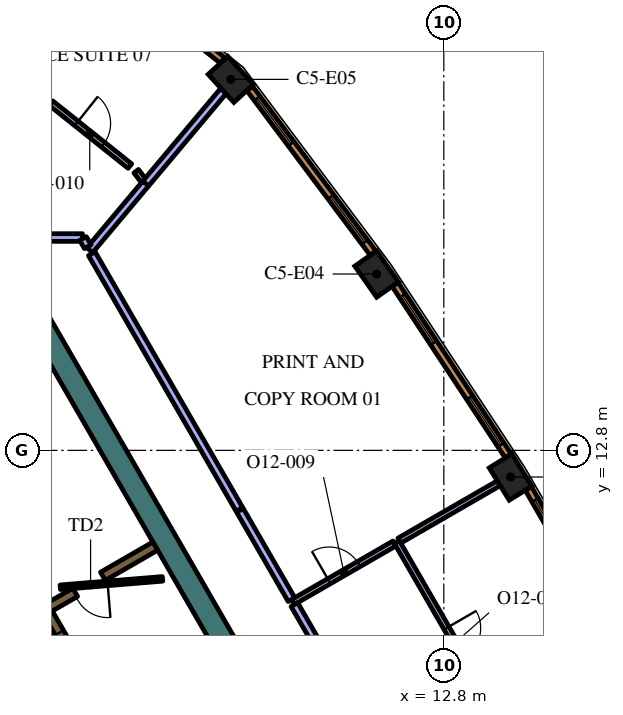
"""IFC4 building model, lengths in metres.
Left out: names, types, materials, properties, quantities, classifications, styles, units other than length and angle.
Written with IfcOpenShell. Run it as: python <this file> out.ifc"""

import sys

from ifc_helpers import new_model, si_unit, direction, frame, frame_2d, origin, origin_2d, place, context, subcontext, project, spatial, rectangle, extrude, element, fill, save


model = new_model("IFC4")
c1 = context("Model", 3, precision=1e-05, world=origin(), true_north=direction((0.0, 1.0)))
c2 = subcontext(c1, "Body", "Model", "MODEL_VIEW")
j1 = project(units=[si_unit("LENGTHUNIT", "METRE"), si_unit("PLANEANGLEUNIT", "RADIAN")], contexts=[c1])
p1 = place(None, origin())
s1 = spatial("IfcSite", under=j1, at=p1, CompositionType="ELEMENT")
p2 = place(p1, origin())
s2 = spatial("IfcBuilding", under=s1, at=p2, CompositionType="ELEMENT")
p3 = place(p2, frame((0.0, 0.0, 283.8)))
s3 = spatial("IfcBuildingStorey", under=s2, at=p3, CompositionType="ELEMENT", Elevation=283.8)
for number, where, z_axis, x_axis in (
    (1, (14.556, 12.098, 0.0), (0.0, 0.0, 1.0), (-0.526, 0.851, 0.0)),
    (2, (11.032, 17.44, 0.0), (0.0, 0.0, 1.0), (-0.575, 0.818, 0.0)),
    (3, (7.195, 22.561, 0.0), (0.0, 0.0, 1.0), (-0.676, 0.737, 0.0)),
):
    element("IfcColumn", number, at=place(p3, frame(where, z_axis=z_axis, x_axis=x_axis)), inside=s3, PredefinedType="COLUMN", context=c2, shape_type="SweptSolid", body=[
        extrude(rectangle(XDim=1.0, YDim=0.7, at=origin_2d()), origin(), (0.0, 0.0, 1.0), 4.2),
    ])
p4 = place(p3, frame((1.989, 16.456, 0.0), z_axis=(0.0, 0.0, 1.0), x_axis=(0.49999102663, -0.8660305845, 0.0)))
e4 = element("IfcWall", 4, at=p4, inside=s3, PredefinedType="SOLIDWALL", context=c2, shape_type="SweptSolid", body=[
    extrude(rectangle(XDim=12.406, YDim=0.6, at=frame_2d((6.203, 0.0))), origin(), (0.0, 0.0, 1.0), 4.2),
])
p5 = place(p3, frame((3.1, 9.064, 0.0), z_axis=(0.0, 0.0, 1.0), x_axis=(-0.866030133475, -0.499991807846, 0.0)))
e5 = element("IfcWall", 5, at=p5, inside=s3, PredefinedType="SOLIDWALL", context=c2, shape_type="SweptSolid", body=[
    extrude(rectangle(XDim=3.217, YDim=0.25, at=frame_2d((1.608, 0.0))), origin(), (0.0, 0.0, 1.0), 4.2),
])
p6 = place(p3, frame((3.83, 9.486, 0.0), z_axis=(0.0, 0.0, 1.0), x_axis=(0.865986202621, 0.500067892261, 0.0)))
e6 = element("IfcWall", 6, at=p6, inside=s3, PredefinedType="SOLIDWALL", context=c2, shape_type="SweptSolid", body=[
    extrude(rectangle(XDim=1.591, YDim=0.25, at=frame_2d((0.795, 0.0))), origin(), (0.0, 0.0, 1.0), 4.2),
])
p7 = place(p3, frame((8.565, -2.185, 0.0), z_axis=(0.0, 0.0, 1.0), x_axis=(-0.499997954832, 0.866026584559, 0.0)))
e7 = element("IfcWall", 7, at=p7, inside=s3, PredefinedType="SOLIDWALL", context=c2, shape_type="SweptSolid", body=[
    extrude(rectangle(XDim=12.35, YDim=0.25, at=frame_2d((6.175, 0.0))), origin(), (0.0, 0.0, 1.0), 4.2),
])
p8 = place(p7, frame((0.685, 0.0, 0.0)))
e8 = element("IfcOpeningElement", 8, at=p8, cuts=e7, PredefinedType="OPENING", context=c2, shape_type="SweptSolid", body=[
    extrude(rectangle(XDim=0.9, YDim=2.1, at=frame_2d((0.45, 1.05))), frame((0.0, 0.135, 0.0), z_axis=(0.0, -1.0, 0.0), x_axis=(1.0, 0.0, 0.0)), (0.0, 0.0, 1.0), 0.27),
])
p9 = place(p7, frame((3.105, 0.0, 0.0)))
e9 = element("IfcOpeningElement", 9, at=p9, cuts=e7, PredefinedType="OPENING", context=c2, shape_type="SweptSolid", body=[
    extrude(rectangle(XDim=1.1, YDim=2.1, at=frame_2d((0.55, 1.05))), frame((0.0, 0.135, 0.0), z_axis=(0.0, -1.0, 0.0), x_axis=(1.0, 0.0, 0.0)), (0.0, 0.0, 1.0), 0.27),
])
p10 = place(p7, frame((5.625, 0.0, 0.0)))
e10 = element("IfcOpeningElement", 10, at=p10, cuts=e7, PredefinedType="OPENING", context=c2, shape_type="SweptSolid", body=[
    extrude(rectangle(XDim=1.1, YDim=2.1, at=frame_2d((0.55, 1.05))), frame((0.0, 0.135, 0.0), z_axis=(0.0, -1.0, 0.0), x_axis=(1.0, 0.0, 0.0)), (0.0, 0.0, 1.0), 0.27),
])
p11 = place(p7, frame((8.145, 0.0, 0.0)))
e11 = element("IfcOpeningElement", 11, at=p11, cuts=e7, PredefinedType="OPENING", context=c2, shape_type="SweptSolid", body=[
    extrude(rectangle(XDim=1.1, YDim=2.1, at=frame_2d((0.55, 1.05))), frame((0.0, 0.135, 0.0), z_axis=(0.0, -1.0, 0.0), x_axis=(1.0, 0.0, 0.0)), (0.0, 0.0, 1.0), 0.27),
])
p12 = place(p7, frame((10.665, 0.0, 0.0)))
e12 = element("IfcOpeningElement", 12, at=p12, cuts=e7, PredefinedType="OPENING", context=c2, shape_type="SweptSolid", body=[
    extrude(rectangle(XDim=1.1, YDim=2.1, at=frame_2d((0.55, 1.05))), frame((0.0, 0.135, 0.0), z_axis=(0.0, -1.0, 0.0), x_axis=(1.0, 0.0, 0.0)), (0.0, 0.0, 1.0), 0.27),
])
p13 = place(p3, frame((5.398, 9.419, 0.0), z_axis=(0.0, 0.0, 1.0), x_axis=(-0.996653416376, -0.081743303248, 0.0)))
e13 = element("IfcWall", 13, at=p13, inside=s3, PredefinedType="PARTITIONING", context=c2, shape_type="SweptSolid", body=[
    extrude(rectangle(XDim=2.7, YDim=0.12, at=frame_2d((1.35, 0.0))), origin(), (0.0, 0.0, 1.0), 3.55),
])
p14 = place(p13, frame((1.45, 0.0, 0.0)))
e14 = element("IfcOpeningElement", 14, at=p14, cuts=e13, PredefinedType="OPENING", context=c2, shape_type="SweptSolid", body=[
    extrude(rectangle(XDim=0.9, YDim=2.1, at=frame_2d((0.45, 1.05))), frame((0.0, 0.07, 0.0), z_axis=(0.0, -1.0, 0.0), x_axis=(1.0, 0.0, 0.0)), (0.0, 0.0, 1.0), 0.14),
])
p15 = place(p3, frame((11.564, 10.387, 0.0), z_axis=(0.0, 0.0, 1.0), x_axis=(0.500002559113, -0.866023926275, 0.0)))
e15 = element("IfcWall", 15, at=p15, inside=s3, PredefinedType="PARTITIONING", context=c2, shape_type="SweptSolid", body=[
    extrude(rectangle(XDim=6.212, YDim=0.15, at=frame_2d((3.106, 0.0))), origin(), (0.0, 0.0, 1.0), 3.55),
])
p16 = place(p15, frame((2.612, 0.0, 0.0)))
e16 = element("IfcOpeningElement", 16, at=p16, cuts=e15, PredefinedType="OPENING", context=c2, shape_type="SweptSolid", body=[
    extrude(rectangle(XDim=0.9, YDim=2.1, at=frame_2d((0.45, 1.05))), frame((0.0, 0.085, 0.0), z_axis=(0.0, -1.0, 0.0), x_axis=(1.0, 0.0, 0.0)), (0.0, 0.0, 1.0), 0.17),
])
p17 = place(p3, frame((11.629, 10.424, 0.0), z_axis=(0.0, 0.0, 1.0), x_axis=(0.866061796884, 0.499936960004, 0.0)))
e17 = element("IfcWall", 17, at=p17, inside=s3, PredefinedType="PARTITIONING", context=c2, shape_type="SweptSolid", body=[
    extrude(rectangle(XDim=3.021, YDim=0.15, at=frame_2d((1.511, 0.0))), origin(), (0.0, 0.0, 1.0), 3.55),
])
p18 = place(p3, frame((8.829, 8.808, 0.0), z_axis=(0.0, 0.0, 1.0), x_axis=(0.866041857893, 0.499971499565, 0.0)))
e18 = element("IfcWall", 18, at=p18, inside=s3, PredefinedType="PARTITIONING", context=c2, shape_type="SweptSolid", body=[
    extrude(rectangle(XDim=3.083, YDim=0.15, at=frame_2d((1.542, 0.0))), origin(), (0.0, 0.0, 1.0), 3.55),
])
p19 = place(p18, frame((1.1, 0.0, 0.0)))
e19 = element("IfcOpeningElement", 19, at=p19, cuts=e18, PredefinedType="OPENING", context=c2, shape_type="SweptSolid", body=[
    extrude(rectangle(XDim=0.9, YDim=2.1, at=frame_2d((0.45, 1.05))), frame((0.0, 0.085, 0.0), z_axis=(0.0, -1.0, 0.0), x_axis=(1.0, 0.0, 0.0)), (0.0, 0.0, 1.0), 0.17),
])
p20 = place(p3, frame((13.436, 0.829, 0.0), z_axis=(0.0, 0.0, 1.0), x_axis=(-0.499983789798, 0.866034762547, 0.0)))
e20 = element("IfcWall", 20, at=p20, inside=s3, PredefinedType="PARTITIONING", context=c2, shape_type="SweptSolid", body=[
    extrude(rectangle(XDim=9.138, YDim=0.2, at=frame_2d((4.569, 0.0))), origin(), (0.0, 0.0, 1.0), 3.55),
])
p21 = place(p3, frame((4.95, 19.814, 0.0), z_axis=(0.0, 0.0, 1.0), x_axis=(0.642981953866, 0.765881326971, 0.0)))
e21 = element("IfcWall", 21, at=p21, inside=s3, PredefinedType="PARTITIONING", context=c2, shape_type="SweptSolid", body=[
    extrude(rectangle(XDim=3.188, YDim=0.2, at=frame_2d((1.594, 0.0))), origin(), (0.0, 0.0, 1.0), 3.55),
])
p22 = place(p3, frame((3.483, 18.067, 0.0), z_axis=(0.0, 0.0, 1.0), x_axis=(0.642896944312, 0.765952687177, 0.0)))
e22 = element("IfcWall", 22, at=p22, inside=s3, PredefinedType="PARTITIONING", context=c2, shape_type="SweptSolid", body=[
    extrude(rectangle(XDim=2.29, YDim=0.2, at=frame_2d((1.145, 0.0))), origin(), (0.0, 0.0, 1.0), 3.55),
])
p23 = place(p3, frame((8.792, 8.873, 0.0), z_axis=(0.0, 0.0, 1.0), x_axis=(-0.499992600721, 0.866029675718, 0.0)))
e23 = element("IfcWall", 23, at=p23, inside=s3, PredefinedType="PARTITIONING", context=c2, shape_type="SweptSolid", body=[
    extrude(rectangle(XDim=2.712, YDim=0.2, at=frame_2d((1.356, 0.0))), origin(), (0.0, 0.0, 1.0), 3.55),
])
p24 = place(p3, frame((7.421, 11.247, 0.0), z_axis=(0.0, 0.0, 1.0), x_axis=(-0.499999024953, 0.866025966727, 0.0)))
e24 = element("IfcWall", 24, at=p24, inside=s3, PredefinedType="PARTITIONING", context=c2, shape_type="SweptSolid", body=[
    extrude(rectangle(XDim=7.769, YDim=0.2, at=frame_2d((3.884, 0.0))), origin(), (0.0, 0.0, 1.0), 3.55),
])
p25 = place(p3, frame((4.891, 19.899, 0.0), z_axis=(0.0, 0.0, 1.0), x_axis=(-0.6, 0.8, 0.0)))
e25 = element("IfcWall", 25, at=p25, inside=s3, PredefinedType="PARTITIONING", context=c2, shape_type="SweptSolid", body=[
    extrude(rectangle(XDim=0.309, YDim=0.15, at=frame_2d((0.154, 0.0))), origin(), (0.0, 0.0, 1.0), 3.55),
])
p26 = place(p3, frame((2.462, 21.937, 0.0), z_axis=(0.0, 0.0, 1.0), x_axis=(0.781630346222, -0.62374193531, 0.0)))
e26 = element("IfcWall", 26, at=p26, inside=s3, PredefinedType="PARTITIONING", context=c2, shape_type="SweptSolid", body=[
    extrude(rectangle(XDim=2.656, YDim=0.15, at=frame_2d((1.328, 0.0))), origin(), (0.0, 0.0, 1.0), 3.55),
])
p27 = place(p26, frame((0.857, 0.0, 0.0)))
e27 = element("IfcOpeningElement", 27, at=p27, cuts=e26, PredefinedType="OPENING", context=c2, shape_type="SweptSolid", body=[
    extrude(rectangle(XDim=0.9, YDim=2.1, at=frame_2d((0.45, 1.05))), frame((0.0, 0.085, 0.0), z_axis=(0.0, -1.0, 0.0), x_axis=(1.0, 0.0, 0.0)), (0.0, 0.0, 1.0), 0.17),
])
p28 = place(p3, frame((3.291, 18.4, 0.0), z_axis=(0.0, 0.0, 1.0), x_axis=(-1.0, 0.0, 0.0)))
e28 = element("IfcWall", 28, at=p28, inside=s3, PredefinedType="PARTITIONING", context=c2, shape_type="SweptSolid", body=[
    extrude(rectangle(XDim=6.582, YDim=0.2, at=frame_2d((3.291, 0.0))), origin(), (0.0, 0.0, 1.0), 3.55),
])
p29 = place(p3, frame((3.43, 18.159, 0.0), z_axis=(0.0, 0.0, 1.0), x_axis=(-0.499949632511, 0.866054481515, 0.0)))
e29 = element("IfcWall", 29, at=p29, inside=s3, PredefinedType="PARTITIONING", context=c2, shape_type="SweptSolid", body=[
    extrude(rectangle(XDim=0.248, YDim=0.2, at=frame_2d((0.124, 0.0))), origin(), (0.0, 0.0, 1.0), 3.55),
])
p30 = place(p3, frame((17.728, 7.114, 0.0), z_axis=(0.0, 0.0, 1.0), x_axis=(-0.500024767483, 0.866011103799, 0.0)))
e30 = element("IfcWall", 30, at=p30, inside=s3, PredefinedType="SOLIDWALL", context=c2, shape_type="SweptSolid", body=[
    extrude(rectangle(XDim=5.406, YDim=0.19, at=frame_2d((2.703, 0.0))), origin(), (0.0, 0.0, 1.0), 3.95),
])
p31 = place(p30, frame((0.346, 0.0, 0.6)))
e31 = element("IfcOpeningElement", 31, at=p31, cuts=e30, PredefinedType="OPENING", context=c2, shape_type="SweptSolid", body=[
    extrude(rectangle(XDim=1.5, YDim=2.85, at=frame_2d((0.75, 1.425))), frame((0.0, 0.105, 0.0), z_axis=(0.0, -1.0, 0.0), x_axis=(1.0, 0.0, 0.0)), (0.0, 0.0, 1.0), 0.21),
])
p32 = place(p30, frame((3.56, 0.0, 0.6)))
e32 = element("IfcOpeningElement", 32, at=p32, cuts=e30, PredefinedType="OPENING", context=c2, shape_type="SweptSolid", body=[
    extrude(rectangle(XDim=1.5, YDim=2.85, at=frame_2d((0.75, 1.425))), frame((0.0, 0.105, 0.0), z_axis=(0.0, -1.0, 0.0), x_axis=(1.0, 0.0, 0.0)), (0.0, 0.0, 1.0), 0.21),
])
p33 = place(p3, frame((14.496, 12.653, 0.0), z_axis=(0.0, 0.0, 1.0), x_axis=(-0.550744054781, 0.83467417962, 0.0)))
e33 = element("IfcWall", 33, at=p33, inside=s3, PredefinedType="SOLIDWALL", context=c2, shape_type="SweptSolid", body=[
    extrude(rectangle(XDim=5.406, YDim=0.19, at=frame_2d((2.703, 0.0))), origin(), (0.0, 0.0, 1.0), 3.95),
])
p34 = place(p33, frame((0.346, 0.0, 0.6)))
e34 = element("IfcOpeningElement", 34, at=p34, cuts=e33, PredefinedType="OPENING", context=c2, shape_type="SweptSolid", body=[
    extrude(rectangle(XDim=1.5, YDim=2.85, at=frame_2d((0.75, 1.425))), frame((0.0, 0.105, 0.0), z_axis=(0.0, -1.0, 0.0), x_axis=(1.0, 0.0, 0.0)), (0.0, 0.0, 1.0), 0.21),
])
p35 = place(p33, frame((3.559, 0.0, 0.6)))
e35 = element("IfcOpeningElement", 35, at=p35, cuts=e33, PredefinedType="OPENING", context=c2, shape_type="SweptSolid", body=[
    extrude(rectangle(XDim=1.5, YDim=2.85, at=frame_2d((0.75, 1.425))), frame((0.0, 0.105, 0.0), z_axis=(0.0, -1.0, 0.0), x_axis=(1.0, 0.0, 0.0)), (0.0, 0.0, 1.0), 0.21),
])
p36 = place(p3, frame((10.938, 17.99, 0.0), z_axis=(0.0, 0.0, 1.0), x_axis=(-0.599559865294, 0.800329911929, 0.0)))
e36 = element("IfcWall", 36, at=p36, inside=s3, PredefinedType="SOLIDWALL", context=c2, shape_type="SweptSolid", body=[
    extrude(rectangle(XDim=5.415, YDim=0.19, at=frame_2d((2.708, 0.0))), origin(), (0.0, 0.0, 1.0), 3.95),
])
p37 = place(p36, frame((0.358, 0.0, 0.6)))
e37 = element("IfcOpeningElement", 37, at=p37, cuts=e36, PredefinedType="OPENING", context=c2, shape_type="SweptSolid", body=[
    extrude(rectangle(XDim=1.5, YDim=2.85, at=frame_2d((0.75, 1.425))), frame((0.0, 0.105, 0.0), z_axis=(0.0, -1.0, 0.0), x_axis=(1.0, 0.0, 0.0)), (0.0, 0.0, 1.0), 0.21),
])
p38 = place(p36, frame((3.593, 0.0, 0.6)))
e38 = element("IfcOpeningElement", 38, at=p38, cuts=e36, PredefinedType="OPENING", context=c2, shape_type="SweptSolid", body=[
    extrude(rectangle(XDim=1.5, YDim=2.85, at=frame_2d((0.75, 1.425))), frame((0.0, 0.105, 0.0), z_axis=(0.0, -1.0, 0.0), x_axis=(1.0, 0.0, 0.0)), (0.0, 0.0, 1.0), 0.21),
])
p39 = place(p3, frame((6.977, 23.061, 0.0), z_axis=(0.0, 0.0, 1.0), x_axis=(-0.781626234064, 0.623747088349, 0.0)))
e39 = element("IfcWall", 39, at=p39, inside=s3, PredefinedType="SOLIDWALL", context=c2, shape_type="SweptSolid", body=[
    extrude(rectangle(XDim=3.237, YDim=0.19, at=frame_2d((1.618, 0.0))), origin(), (0.0, 0.0, 1.0), 3.95),
])
p40 = place(p39, frame((1.068, 0.0, 0.6)))
e40 = element("IfcOpeningElement", 40, at=p40, cuts=e39, PredefinedType="OPENING", context=c2, shape_type="SweptSolid", body=[
    extrude(rectangle(XDim=1.1, YDim=2.85, at=frame_2d((0.55, 1.425))), frame((0.0, 0.105, 0.0), z_axis=(0.0, -1.0, 0.0), x_axis=(1.0, 0.0, 0.0)), (0.0, 0.0, 1.0), 0.21),
])
p41 = place(p12, origin())
e41 = element("IfcDoor", 41, at=p41, inside=s3, OperationType="DOUBLE_DOOR_SLIDING", PredefinedType="DOOR", context=c2, shape_type="SweptSolid", body=[
    extrude(rectangle(XDim=1.1, YDim=2.1, at=frame_2d((0.55, 1.05))), frame((0.0, 0.025, 0.0), z_axis=(0.0, -1.0, 0.0), x_axis=(1.0, 0.0, 0.0)), (0.0, 0.0, 1.0), 0.05),
])
fill(e12, e41)
p42 = place(p14, origin())
e42 = element("IfcDoor", 42, at=p42, inside=s3, OperationType="SINGLE_SWING_LEFT", PredefinedType="DOOR", context=c2, shape_type="SweptSolid", body=[
    extrude(rectangle(XDim=0.9, YDim=2.1, at=frame_2d((0.45, 1.05))), frame((0.0, 0.025, 0.0), z_axis=(0.0, -1.0, 0.0), x_axis=(1.0, 0.0, 0.0)), (0.0, 0.0, 1.0), 0.05),
])
fill(e14, e42)
p43 = place(p16, origin())
e43 = element("IfcDoor", 43, at=p43, inside=s3, OperationType="SINGLE_SWING_LEFT", PredefinedType="DOOR", context=c2, shape_type="SweptSolid", body=[
    extrude(rectangle(XDim=0.9, YDim=2.1, at=frame_2d((0.45, 1.05))), frame((0.0, 0.025, 0.0), z_axis=(0.0, -1.0, 0.0), x_axis=(1.0, 0.0, 0.0)), (0.0, 0.0, 1.0), 0.05),
])
fill(e16, e43)
p44 = place(p19, origin())
e44 = element("IfcDoor", 44, at=p44, inside=s3, OperationType="SINGLE_SWING_RIGHT", PredefinedType="DOOR", context=c2, shape_type="SweptSolid", body=[
    extrude(rectangle(XDim=0.9, YDim=2.1, at=frame_2d((0.45, 1.05))), frame((0.0, 0.025, 0.0), z_axis=(0.0, -1.0, 0.0), x_axis=(1.0, 0.0, 0.0)), (0.0, 0.0, 1.0), 0.05),
])
fill(e19, e44)
p45 = place(p27, origin())
e45 = element("IfcDoor", 45, at=p45, inside=s3, OperationType="SINGLE_SWING_LEFT", PredefinedType="DOOR", context=c2, shape_type="SweptSolid", body=[
    extrude(rectangle(XDim=0.9, YDim=2.1, at=frame_2d((0.45, 1.05))), frame((0.0, 0.025, 0.0), z_axis=(0.0, -1.0, 0.0), x_axis=(1.0, 0.0, 0.0)), (0.0, 0.0, 1.0), 0.05),
])
fill(e27, e45)
p46 = place(p32, origin())
e46 = element("IfcWindow", 46, at=p46, inside=s3, PartitioningType="SINGLE_PANEL", PredefinedType="WINDOW", context=c2, shape_type="SweptSolid", body=[
    extrude(rectangle(XDim=1.5, YDim=2.85, at=frame_2d((0.75, 1.425))), frame((0.0, 0.045, 0.0), z_axis=(0.0, -1.0, 0.0), x_axis=(1.0, 0.0, 0.0)), (0.0, 0.0, 1.0), 0.06),
])
fill(e32, e46)
p47 = place(p34, origin())
e47 = element("IfcWindow", 47, at=p47, inside=s3, PartitioningType="SINGLE_PANEL", PredefinedType="WINDOW", context=c2, shape_type="SweptSolid", body=[
    extrude(rectangle(XDim=1.5, YDim=2.85, at=frame_2d((0.75, 1.425))), frame((0.0, 0.045, 0.0), z_axis=(0.0, -1.0, 0.0), x_axis=(1.0, 0.0, 0.0)), (0.0, 0.0, 1.0), 0.06),
])
fill(e34, e47)
p48 = place(p35, origin())
e48 = element("IfcWindow", 48, at=p48, inside=s3, PartitioningType="SINGLE_PANEL", PredefinedType="WINDOW", context=c2, shape_type="SweptSolid", body=[
    extrude(rectangle(XDim=1.5, YDim=2.85, at=frame_2d((0.75, 1.425))), frame((0.0, 0.045, 0.0), z_axis=(0.0, -1.0, 0.0), x_axis=(1.0, 0.0, 0.0)), (0.0, 0.0, 1.0), 0.06),
])
fill(e35, e48)
p49 = place(p37, origin())
e49 = element("IfcWindow", 49, at=p49, inside=s3, PartitioningType="SINGLE_PANEL", PredefinedType="WINDOW", context=c2, shape_type="SweptSolid", body=[
    extrude(rectangle(XDim=1.5, YDim=2.85, at=frame_2d((0.75, 1.425))), frame((0.0, 0.045, 0.0), z_axis=(0.0, -1.0, 0.0), x_axis=(1.0, 0.0, 0.0)), (0.0, 0.0, 1.0), 0.06),
])
fill(e37, e49)
p50 = place(p38, origin())
e50 = element("IfcWindow", 50, at=p50, inside=s3, PartitioningType="SINGLE_PANEL", PredefinedType="WINDOW", context=c2, shape_type="SweptSolid", body=[
    extrude(rectangle(XDim=1.5, YDim=2.85, at=frame_2d((0.75, 1.425))), frame((0.0, 0.045, 0.0), z_axis=(0.0, -1.0, 0.0), x_axis=(1.0, 0.0, 0.0)), (0.0, 0.0, 1.0), 0.06),
])
fill(e38, e50)
save(model, sys.argv[1])
